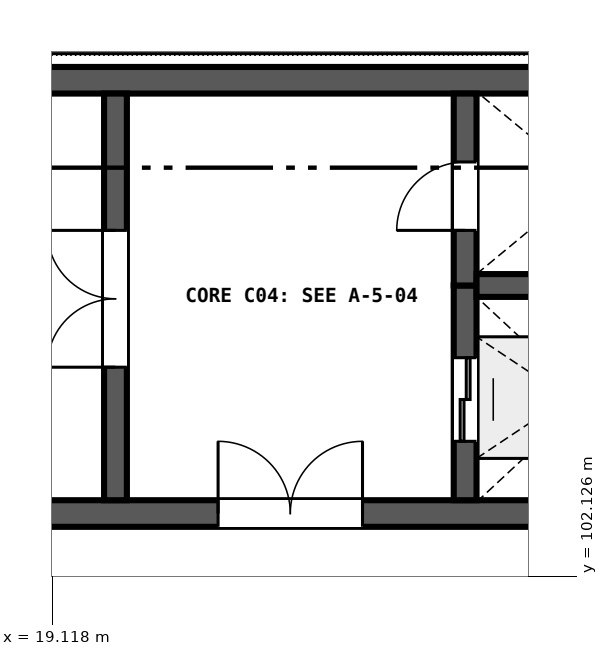
"""IFC4 building model, lengths in metres.
Left out: names, types, materials, properties, quantities, classifications, styles, units other than length and angle.
Written with IfcOpenShell. Run it as: python <this file> out.ifc"""

import sys

from ifc_helpers import new_model, si_unit, direction, frame, frame_2d, origin, place, context, subcontext, project, spatial, rectangle, extrude, element, fill, save


model = new_model("IFC4")
c1 = context("Model", 3, precision=1e-05, world=origin(), true_north=direction((0.0, 1.0)))
c2 = subcontext(c1, "Body", "Model", "MODEL_VIEW")
j1 = project(units=[si_unit("LENGTHUNIT", "METRE"), si_unit("PLANEANGLEUNIT", "RADIAN")], contexts=[c1])
p1 = place(None, origin())
s1 = spatial("IfcSite", under=j1, at=p1, CompositionType="ELEMENT")
p2 = place(p1, origin())
s2 = spatial("IfcBuilding", under=s1, at=p2, CompositionType="ELEMENT")
p3 = place(p2, frame((0.0, 0.0, 9.6)))
s3 = spatial("IfcBuildingStorey", under=s2, at=p3, CompositionType="ELEMENT", Elevation=9.6)
p4 = place(p3, frame((9.9, 102.95, 0.0), z_axis=(0.0, 0.0, 1.0), x_axis=(1.0, 0.0, 0.0)))
e1 = element("IfcWall", 1, at=p4, inside=s3, PredefinedType="SHEAR", context=c2, shape_type="SweptSolid", body=[
    extrude(rectangle(XDim=18.0, YDim=0.35, at=frame_2d((9.0, 0.0))), origin(), (0.0, 0.0, 1.0), 4.5),
])
p5 = place(p4, frame((11.4, 0.0, 0.0)))
e2 = element("IfcOpeningElement", 2, at=p5, cuts=e1, PredefinedType="OPENING", context=c2, shape_type="SweptSolid", body=[
    extrude(rectangle(XDim=1.9, YDim=2.25, at=frame_2d((0.95, 1.125))), frame((0.0, 0.185, 0.0), z_axis=(0.0, -1.0, 0.0), x_axis=(1.0, 0.0, 0.0)), (0.0, 0.0, 1.0), 0.37),
])
p6 = place(p3, frame((27.9, 108.65, 0.0), z_axis=(0.0, 0.0, 1.0), x_axis=(-1.0, 0.0, 0.0)))
e3 = element("IfcWall", 3, at=p6, inside=s3, PredefinedType="SHEAR", context=c2, shape_type="SweptSolid", body=[
    extrude(rectangle(XDim=18.0, YDim=0.35, at=frame_2d((9.0, 0.0))), origin(), (0.0, 0.0, 1.0), 4.5),
])
p7 = place(p3, frame((19.95, 103.125, 0.0), z_axis=(0.0, 0.0, 1.0), x_axis=(0.0, 1.0, 0.0)))
e4 = element("IfcWall", 4, at=p7, inside=s3, PredefinedType="SHEAR", context=c2, shape_type="SweptSolid", body=[
    extrude(rectangle(XDim=5.35, YDim=0.3, at=frame_2d((2.675, 0.0))), origin(), (0.0, 0.0, 1.0), 4.5),
])
p8 = place(p7, frame((1.75, 0.0, 0.0)))
e5 = element("IfcOpeningElement", 5, at=p8, cuts=e4, PredefinedType="OPENING", context=c2, shape_type="SweptSolid", body=[
    extrude(rectangle(XDim=1.8, YDim=2.25, at=frame_2d((0.9, 1.125))), frame((0.0, 0.16, 0.0), z_axis=(0.0, -1.0, 0.0), x_axis=(1.0, 0.0, 0.0)), (0.0, 0.0, 1.0), 0.32),
])
p9 = place(p3, frame((24.55, 103.125, 0.0), z_axis=(0.0, 0.0, 1.0), x_axis=(0.0, 1.0, 0.0)))
e6 = element("IfcWall", 6, at=p9, inside=s3, PredefinedType="SHEAR", context=c2, shape_type="SweptSolid", body=[
    extrude(rectangle(XDim=2.825, YDim=0.3, at=frame_2d((1.413, 0.0))), origin(), (0.0, 0.0, 1.0), 4.5),
])
p10 = place(p9, frame((0.775, 0.0, 0.0)))
e7 = element("IfcOpeningElement", 7, at=p10, cuts=e6, PredefinedType="OPENING", context=c2, shape_type="SweptSolid", body=[
    extrude(rectangle(XDim=1.1, YDim=2.1, at=frame_2d((0.55, 1.05))), frame((0.0, 0.16, 0.0), z_axis=(0.0, -1.0, 0.0), x_axis=(1.0, 0.0, 0.0)), (0.0, 0.0, 1.0), 0.32),
])
p11 = place(p3, frame((24.55, 105.95, 0.0), z_axis=(0.0, 0.0, 1.0), x_axis=(0.0, 1.0, 0.0)))
e8 = element("IfcWall", 8, at=p11, inside=s3, PredefinedType="SHEAR", context=c2, shape_type="SweptSolid", body=[
    extrude(rectangle(XDim=2.525, YDim=0.3, at=frame_2d((1.263, 0.0))), origin(), (0.0, 0.0, 1.0), 4.5),
])
p12 = place(p11, frame((0.725, 0.0, 0.0)))
e9 = element("IfcOpeningElement", 9, at=p12, cuts=e8, PredefinedType="OPENING", context=c2, shape_type="SweptSolid", body=[
    extrude(rectangle(XDim=0.9, YDim=2.1, at=frame_2d((0.45, 1.05))), frame((0.0, 0.16, 0.0), z_axis=(0.0, -1.0, 0.0), x_axis=(1.0, 0.0, 0.0)), (0.0, 0.0, 1.0), 0.32),
])
p13 = place(p3, frame((24.7, 105.95, 0.0), z_axis=(0.0, 0.0, 1.0), x_axis=(1.0, 0.0, 0.0)))
e10 = element("IfcWall", 10, at=p13, inside=s3, PredefinedType="SHEAR", context=c2, shape_type="SweptSolid", body=[
    extrude(rectangle(XDim=2.875, YDim=0.3, at=frame_2d((1.438, 0.0))), origin(), (0.0, 0.0, 1.0), 4.5),
])
p14 = place(p8, origin())
e11 = element("IfcDoor", 11, at=p14, inside=s3, OperationType="DOUBLE_DOOR_SINGLE_SWING", PredefinedType="DOOR", context=c2, shape_type="SweptSolid", body=[
    extrude(rectangle(XDim=1.8, YDim=2.25, at=frame_2d((0.9, 1.125))), frame((0.0, 0.025, 0.0), z_axis=(0.0, -1.0, 0.0), x_axis=(1.0, 0.0, 0.0)), (0.0, 0.0, 1.0), 0.05),
])
fill(e5, e11)
p15 = place(p12, origin())
e12 = element("IfcDoor", 12, at=p15, inside=s3, OperationType="SINGLE_SWING_LEFT", PredefinedType="DOOR", context=c2, shape_type="SweptSolid", body=[
    extrude(rectangle(XDim=0.9, YDim=2.1, at=frame_2d((0.45, 1.05))), frame((0.0, 0.025, 0.0), z_axis=(0.0, -1.0, 0.0), x_axis=(1.0, 0.0, 0.0)), (0.0, 0.0, 1.0), 0.05),
])
fill(e9, e12)
p16 = place(p10, origin())
e13 = element("IfcDoor", 13, at=p16, inside=s3, OperationType="DOUBLE_DOOR_SLIDING", PredefinedType="DOOR", context=c2, shape_type="SweptSolid", body=[
    extrude(rectangle(XDim=1.1, YDim=2.1, at=frame_2d((0.55, 1.05))), frame((0.0, 0.025, 0.0), z_axis=(0.0, -1.0, 0.0), x_axis=(1.0, 0.0, 0.0)), (0.0, 0.0, 1.0), 0.05),
])
fill(e7, e13)
p17 = place(p5, origin())
e14 = element("IfcDoor", 14, at=p17, inside=s3, OperationType="DOUBLE_DOOR_SINGLE_SWING", PredefinedType="DOOR", context=c2, shape_type="SweptSolid", body=[
    extrude(rectangle(XDim=1.9, YDim=2.25, at=frame_2d((0.95, 1.125))), frame((0.0, 0.025, 0.0), z_axis=(0.0, -1.0, 0.0), x_axis=(1.0, 0.0, 0.0)), (0.0, 0.0, 1.0), 0.05),
])
fill(e2, e14)
save(model, sys.argv[1])
